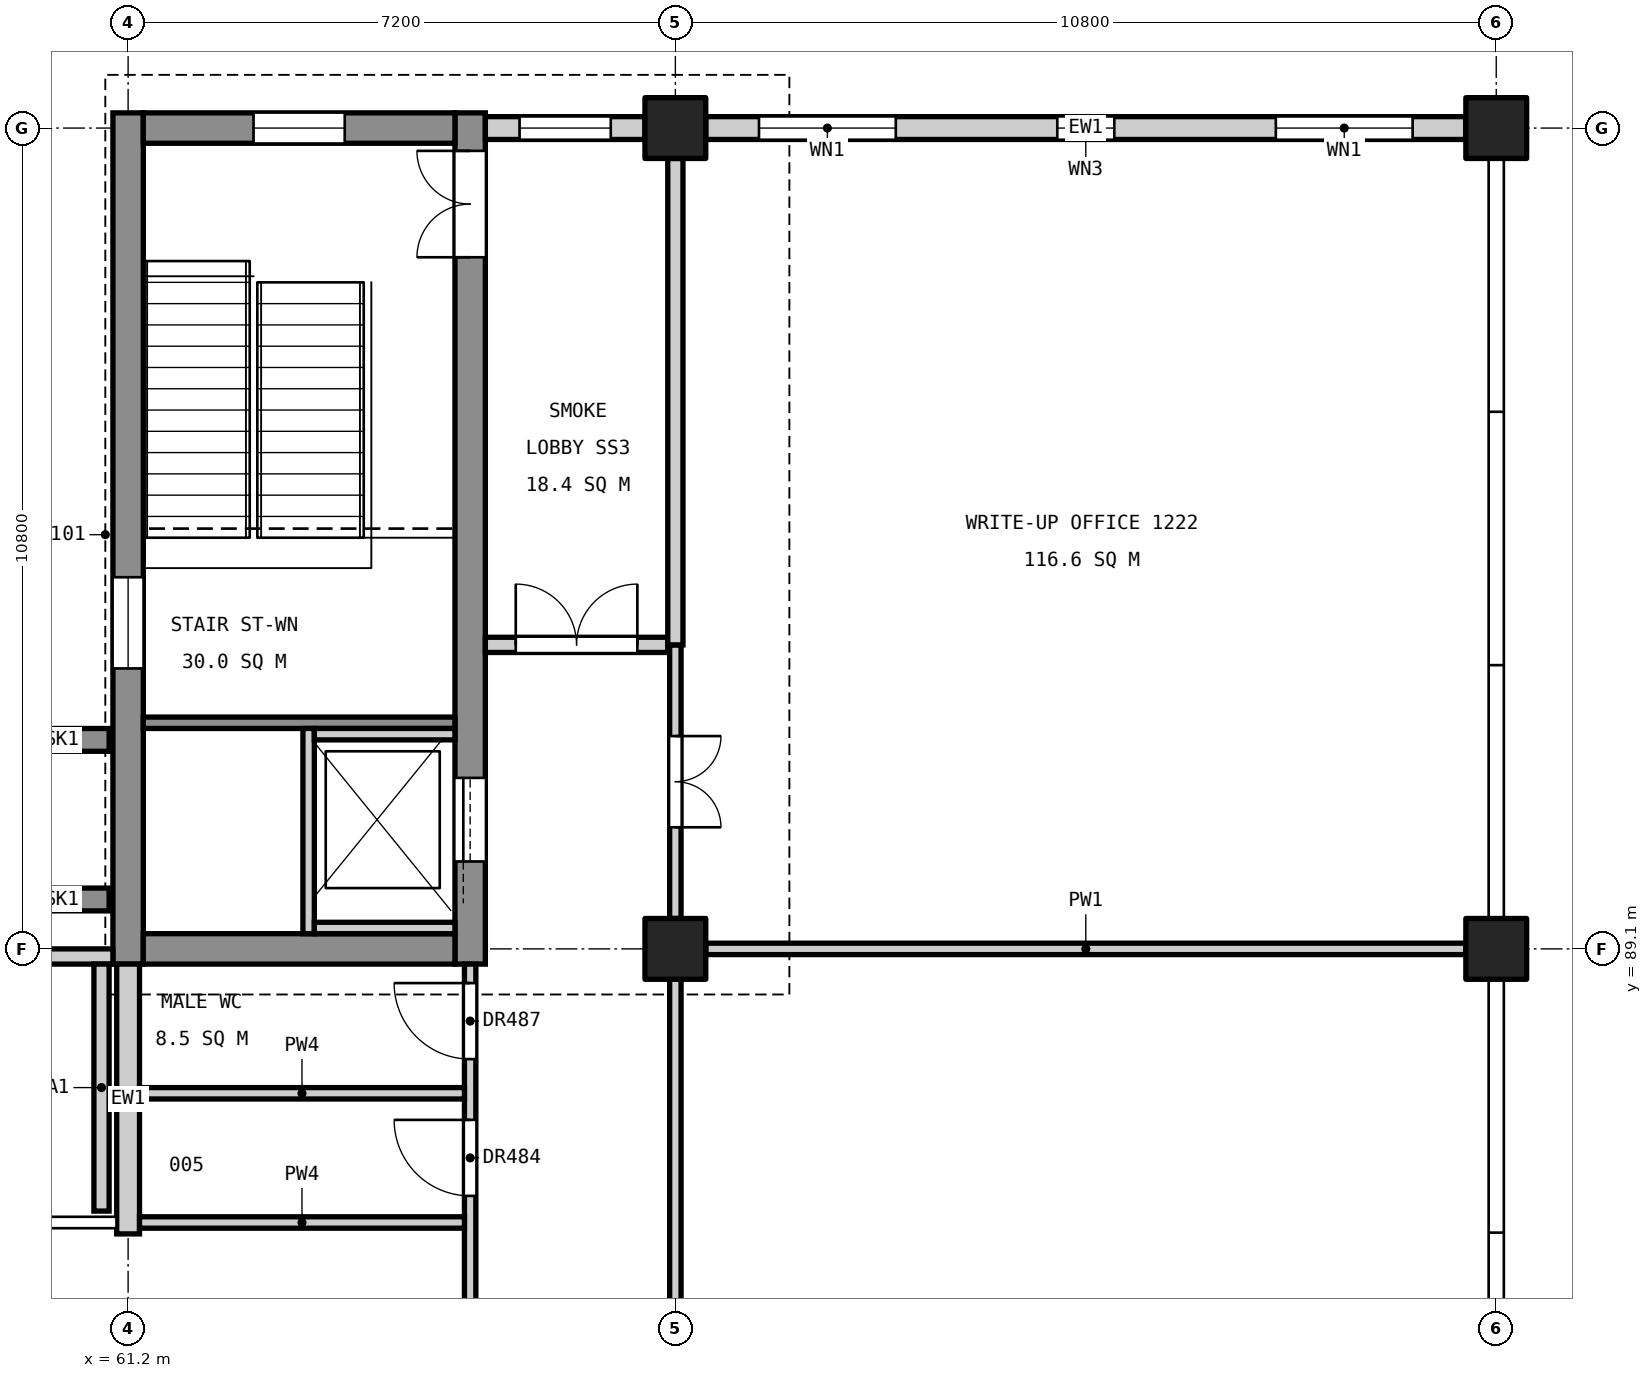
"""IFC4 building model, lengths in metres.
Left out: names, types, materials, properties, quantities, classifications, styles, units other than length and angle.
Written with IfcOpenShell. Run it as: python <this file> out.ifc"""

import sys

from ifc_helpers import new_model, si_unit, direction, frame, frame_2d, origin, origin_2d, place, context, subcontext, project, spatial, rectangle, extrude, element, fill, save


model = new_model("IFC4")
c1 = context("Model", 3, precision=1e-05, world=origin(), true_north=direction((0.0, 1.0)))
c2 = subcontext(c1, "Body", "Model", "MODEL_VIEW")
j1 = project(units=[si_unit("LENGTHUNIT", "METRE"), si_unit("PLANEANGLEUNIT", "RADIAN")], contexts=[c1])
p1 = place(None, origin())
s1 = spatial("IfcSite", under=j1, at=p1, CompositionType="ELEMENT")
p2 = place(p1, origin())
s2 = spatial("IfcBuilding", under=s1, at=p2, CompositionType="ELEMENT")
p3 = place(p2, frame((0.0, 0.0, 60.6)))
s3 = spatial("IfcBuildingStorey", under=s2, at=p3, CompositionType="ELEMENT", Elevation=60.6)
for number, where, z_axis, x_axis in (
    (1, (68.4, 89.1, 0.0), (0.0, 0.0, 1.0), (1.0, 0.0, 0.0)),
    (2, (68.4, 99.9, 0.0), (0.0, 0.0, 1.0), (1.0, 0.0, 0.0)),
    (3, (79.2, 89.1, 0.0), (0.0, 0.0, 1.0), (1.0, 0.0, 0.0)),
    (4, (79.2, 99.9, 0.0), (0.0, 0.0, 1.0), (1.0, 0.0, 0.0)),
):
    element("IfcColumn", number, at=place(p3, frame(where, z_axis=z_axis, x_axis=x_axis)), inside=s3, PredefinedType="COLUMN", context=c2, shape_type="SweptSolid", body=[
        extrude(rectangle(XDim=0.8, YDim=0.8, at=origin_2d()), origin(), (0.0, 0.0, 1.0), 4.8),
    ])
p4 = place(p3, frame((61.2, 88.9, 0.0), z_axis=(0.0, 0.0, 1.0), x_axis=(0.0, 1.0, 0.0)))
e5 = element("IfcWall", 5, at=p4, inside=s3, PredefinedType="SHEAR", context=c2, shape_type="SweptSolid", body=[
    extrude(rectangle(XDim=11.2, YDim=0.4, at=frame_2d((5.6, 0.0))), origin(), (0.0, 0.0, 1.0), 4.55),
])
p5 = place(p4, frame((3.89, 0.0, 3.4)))
e6 = element("IfcOpeningElement", 6, at=p5, cuts=e5, PredefinedType="OPENING", context=c2, shape_type="SweptSolid", body=[
    extrude(rectangle(XDim=1.2, YDim=0.9, at=frame_2d((0.6, 0.45))), frame((0.0, 0.21, 0.0), z_axis=(0.0, -1.0, 0.0), x_axis=(1.0, 0.0, 0.0)), (0.0, 0.0, 1.0), 0.42),
])
p6 = place(p3, frame((65.7, 88.9, 0.0), z_axis=(0.0, 0.0, 1.0), x_axis=(0.0, 1.0, 0.0)))
e7 = element("IfcWall", 7, at=p6, inside=s3, PredefinedType="SHEAR", context=c2, shape_type="SweptSolid", body=[
    extrude(rectangle(XDim=11.2, YDim=0.4, at=frame_2d((5.6, 0.0))), origin(), (0.0, 0.0, 1.0), 4.55),
])
p7 = place(p6, frame((9.3, 0.0, 0.0)))
e8 = element("IfcOpeningElement", 8, at=p7, cuts=e7, PredefinedType="OPENING", context=c2, shape_type="SweptSolid", body=[
    extrude(rectangle(XDim=1.4, YDim=2.1, at=frame_2d((0.7, 1.05))), frame((0.0, 0.21, 0.0), z_axis=(0.0, -1.0, 0.0), x_axis=(1.0, 0.0, 0.0)), (0.0, 0.0, 1.0), 0.42),
])
p8 = place(p6, frame((1.35, 0.0, 0.0)))
e9 = element("IfcOpeningElement", 9, at=p8, cuts=e7, PredefinedType="OPENING", context=c2, shape_type="SweptSolid", body=[
    extrude(rectangle(XDim=1.1, YDim=2.1, at=frame_2d((0.55, 1.05))), frame((0.0, 0.21, 0.0), z_axis=(0.0, -1.0, 0.0), x_axis=(1.0, 0.0, 0.0)), (0.0, 0.0, 1.0), 0.42),
])
p9 = place(p3, frame((61.4, 89.1, 0.0), z_axis=(0.0, 0.0, 1.0), x_axis=(1.0, 0.0, 0.0)))
e10 = element("IfcWall", 10, at=p9, inside=s3, PredefinedType="SHEAR", context=c2, shape_type="SweptSolid", body=[
    extrude(rectangle(XDim=4.1, YDim=0.4, at=frame_2d((2.05, 0.0))), origin(), (0.0, 0.0, 1.0), 4.55),
])
p10 = place(p3, frame((61.4, 99.9, 0.0), z_axis=(0.0, 0.0, 1.0), x_axis=(1.0, 0.0, 0.0)))
e11 = element("IfcWall", 11, at=p10, inside=s3, PredefinedType="SHEAR", context=c2, shape_type="SweptSolid", body=[
    extrude(rectangle(XDim=4.1, YDim=0.4, at=frame_2d((2.05, 0.0))), origin(), (0.0, 0.0, 1.0), 4.55),
])
p11 = place(p10, frame((1.45, 0.0, 3.4)))
e12 = element("IfcOpeningElement", 12, at=p11, cuts=e11, PredefinedType="OPENING", context=c2, shape_type="SweptSolid", body=[
    extrude(rectangle(XDim=1.2, YDim=0.9, at=frame_2d((0.6, 0.45))), frame((0.0, 0.21, 0.0), z_axis=(0.0, -1.0, 0.0), x_axis=(1.0, 0.0, 0.0)), (0.0, 0.0, 1.0), 0.42),
])
for number, where, z_axis, x_axis in (
    (13, (60.95, 89.75, 0.0), (0.0, 0.0, 1.0), (-1.0, 0.0, 0.0)),
    (14, (60.95, 91.85, 0.0), (0.0, 0.0, 1.0), (-1.0, 0.0, 0.0)),
):
    element("IfcWall", number, at=place(p3, frame(where, z_axis=z_axis, x_axis=x_axis)), inside=s3, PredefinedType="SHEAR", context=c2, shape_type="SweptSolid", body=[
        extrude(rectangle(XDim=1.25, YDim=0.3, at=frame_2d((0.625, 0.0))), origin(), (0.0, 0.0, 1.0), 4.8),
    ])
p12 = place(p3, frame((61.4, 92.075, 0.0), z_axis=(0.0, 0.0, 1.0), x_axis=(1.0, 0.0, 0.0)))
e15 = element("IfcWall", 15, at=p12, inside=s3, PredefinedType="SOLIDWALL", context=c2, shape_type="SweptSolid", body=[
    extrude(rectangle(XDim=4.1, YDim=0.15, at=frame_2d((2.05, 0.0))), origin(), (0.0, 0.0, 1.0), 4.55),
])
p13 = place(p3, frame((63.575, 92.0, 0.0), z_axis=(0.0, 0.0, 1.0), x_axis=(0.0, -1.0, 0.0)))
e16 = element("IfcWall", 16, at=p13, inside=s3, PredefinedType="SOLIDWALL", context=c2, shape_type="SweptSolid", body=[
    extrude(rectangle(XDim=2.7, YDim=0.15, at=frame_2d((1.35, 0.0))), origin(), (0.0, 0.0, 1.0), 4.8),
])
for number, where, z_axis, x_axis in (
    (17, (63.65, 91.925, 0.0), (0.0, 0.0, 1.0), (1.0, 0.0, 0.0)),
    (18, (63.65, 89.375, 0.0), (0.0, 0.0, 1.0), (1.0, 0.0, 0.0)),
):
    element("IfcWall", number, at=place(p3, frame(where, z_axis=z_axis, x_axis=x_axis)), inside=s3, PredefinedType="SOLIDWALL", context=c2, shape_type="SweptSolid", body=[
        extrude(rectangle(XDim=1.85, YDim=0.15, at=frame_2d((0.925, 0.0))), origin(), (0.0, 0.0, 1.0), 4.8),
    ])
p14 = place(p3, frame((57.6, 89.0, 0.0), z_axis=(0.0, 0.0, 1.0), x_axis=(1.0, 0.0, 0.0)))
e19 = element("IfcWall", 19, at=p14, inside=s3, PredefinedType="PARAPET", context=c2, shape_type="SweptSolid", body=[
    extrude(rectangle(XDim=3.4, YDim=0.2, at=frame_2d((1.7, 0.0))), origin(), (0.0, 0.0, 1.0), 1.2),
])
p15 = place(p3, frame((60.85, 88.9, 0.0), z_axis=(0.0, 0.0, 1.0), x_axis=(0.0, -1.0, 0.0)))
e20 = element("IfcWall", 20, at=p15, inside=s3, PredefinedType="PARAPET", context=c2, shape_type="SweptSolid", body=[
    extrude(rectangle(XDim=3.25, YDim=0.2, at=frame_2d((1.625, 0.0))), origin(), (0.0, 0.0, 1.0), 1.2),
])
p16 = place(p3, frame((61.2, 85.35, 0.0), z_axis=(0.0, 0.0, 1.0), x_axis=(0.0, 1.0, 0.0)))
e21 = element("IfcWall", 21, at=p16, inside=s3, PredefinedType="STANDARD", context=c2, shape_type="SweptSolid", body=[
    extrude(rectangle(XDim=3.55, YDim=0.3, at=frame_2d((1.775, 0.0))), origin(), (0.0, 0.0, 1.0), 3.65),
])
p17 = place(p3, frame((65.9, 99.9, 0.0), z_axis=(0.0, 0.0, 1.0), x_axis=(1.0, 0.0, 0.0)))
e22 = element("IfcWall", 22, at=p17, inside=s3, PredefinedType="STANDARD", context=c2, shape_type="SweptSolid", body=[
    extrude(rectangle(XDim=2.1, YDim=0.3, at=frame_2d((1.05, 0.0))), origin(), (0.0, 0.0, 1.0), 3.85),
])
p18 = place(p17, frame((0.45, 0.0, 0.9)))
e23 = element("IfcOpeningElement", 23, at=p18, cuts=e22, PredefinedType="OPENING", context=c2, shape_type="SweptSolid", body=[
    extrude(rectangle(XDim=1.2, YDim=2.4, at=frame_2d((0.6, 1.2))), frame((0.0, 0.16, 0.0), z_axis=(0.0, -1.0, 0.0), x_axis=(1.0, 0.0, 0.0)), (0.0, 0.0, 1.0), 0.32),
])
p19 = place(p3, frame((68.8, 99.9, 0.0), z_axis=(0.0, 0.0, 1.0), x_axis=(1.0, 0.0, 0.0)))
e24 = element("IfcWall", 24, at=p19, inside=s3, PredefinedType="STANDARD", context=c2, shape_type="SweptSolid", body=[
    extrude(rectangle(XDim=10.0, YDim=0.3, at=frame_2d((5.0, 0.0))), origin(), (0.0, 0.0, 1.0), 3.85),
])
p20 = place(p19, frame((0.7, 0.0, 0.9)))
e25 = element("IfcOpeningElement", 25, at=p20, cuts=e24, PredefinedType="OPENING", context=c2, shape_type="SweptSolid", body=[
    extrude(rectangle(XDim=1.8, YDim=2.4, at=frame_2d((0.9, 1.2))), frame((0.0, 0.16, 0.0), z_axis=(0.0, -1.0, 0.0), x_axis=(1.0, 0.0, 0.0)), (0.0, 0.0, 1.0), 0.32),
])
p21 = place(p19, frame((4.625, 0.0, 0.8)))
e26 = element("IfcOpeningElement", 26, at=p21, cuts=e24, PredefinedType="OPENING", context=c2, shape_type="SweptSolid", body=[
    extrude(rectangle(XDim=0.75, YDim=1.2, at=frame_2d((0.375, 0.6))), frame((0.0, 0.16, 0.0), z_axis=(0.0, -1.0, 0.0), x_axis=(1.0, 0.0, 0.0)), (0.0, 0.0, 1.0), 0.32),
])
p22 = place(p19, frame((7.5, 0.0, 0.9)))
e27 = element("IfcOpeningElement", 27, at=p22, cuts=e24, PredefinedType="OPENING", context=c2, shape_type="SweptSolid", body=[
    extrude(rectangle(XDim=1.8, YDim=2.4, at=frame_2d((0.9, 1.2))), frame((0.0, 0.16, 0.0), z_axis=(0.0, -1.0, 0.0), x_axis=(1.0, 0.0, 0.0)), (0.0, 0.0, 1.0), 0.32),
])
p23 = place(p3, frame((65.7, 78.45, 0.0), z_axis=(0.0, 0.0, 1.0), x_axis=(0.0, 1.0, 0.0)))
e28 = element("IfcWall", 28, at=p23, inside=s3, PredefinedType="PARTITIONING", context=c2, shape_type="SweptSolid", body=[
    extrude(rectangle(XDim=10.45, YDim=0.15, at=frame_2d((5.225, 0.0))), origin(), (0.0, 0.0, 1.0), 3.55),
])
p24 = place(p23, frame((7.4, 0.0, 0.0)))
e29 = element("IfcOpeningElement", 29, at=p24, cuts=e28, PredefinedType="OPENING", context=c2, shape_type="SweptSolid", body=[
    extrude(rectangle(XDim=1.0, YDim=2.1, at=frame_2d((0.5, 1.05))), frame((0.0, 0.085, 0.0), z_axis=(0.0, -1.0, 0.0), x_axis=(1.0, 0.0, 0.0)), (0.0, 0.0, 1.0), 0.17),
])
p25 = place(p23, frame((9.2, 0.0, 0.0)))
e30 = element("IfcOpeningElement", 30, at=p25, cuts=e28, PredefinedType="OPENING", context=c2, shape_type="SweptSolid", body=[
    extrude(rectangle(XDim=1.0, YDim=2.1, at=frame_2d((0.5, 1.05))), frame((0.0, 0.085, 0.0), z_axis=(0.0, -1.0, 0.0), x_axis=(1.0, 0.0, 0.0)), (0.0, 0.0, 1.0), 0.17),
])
p26 = place(p23, frame((2.95, 0.0, 0.0)))
e31 = element("IfcOpeningElement", 31, at=p26, cuts=e28, PredefinedType="OPENING", context=c2, shape_type="SweptSolid", body=[
    extrude(rectangle(XDim=1.0, YDim=2.1, at=frame_2d((0.5, 1.05))), frame((0.0, 0.085, 0.0), z_axis=(0.0, -1.0, 0.0), x_axis=(1.0, 0.0, 0.0)), (0.0, 0.0, 1.0), 0.17),
])
p27 = place(p3, frame((61.35, 85.5, 0.0), z_axis=(0.0, 0.0, 1.0), x_axis=(1.0, 0.0, 0.0)))
e32 = element("IfcWall", 32, at=p27, inside=s3, PredefinedType="PARTITIONING", context=c2, shape_type="SweptSolid", body=[
    extrude(rectangle(XDim=4.275, YDim=0.15, at=frame_2d((2.137, 0.0))), origin(), (0.0, 0.0, 1.0), 3.85),
])
p28 = place(p3, frame((61.35, 87.2, 0.0), z_axis=(0.0, 0.0, 1.0), x_axis=(1.0, 0.0, 0.0)))
e33 = element("IfcWall", 33, at=p28, inside=s3, PredefinedType="PARTITIONING", context=c2, shape_type="SweptSolid", body=[
    extrude(rectangle(XDim=4.275, YDim=0.15, at=frame_2d((2.137, 0.0))), origin(), (0.0, 0.0, 1.0), 3.55),
])
p29 = place(p3, frame((65.9, 93.1, 0.0), z_axis=(0.0, 0.0, 1.0), x_axis=(1.0, 0.0, 0.0)))
e34 = element("IfcWall", 34, at=p29, inside=s3, PredefinedType="PARTITIONING", context=c2, shape_type="SweptSolid", body=[
    extrude(rectangle(XDim=2.4, YDim=0.2, at=frame_2d((1.2, 0.0))), origin(), (0.0, 0.0, 1.0), 3.55),
])
p30 = place(p29, frame((0.4, 0.0, 0.0)))
e35 = element("IfcOpeningElement", 35, at=p30, cuts=e34, PredefinedType="OPENING", context=c2, shape_type="SweptSolid", body=[
    extrude(rectangle(XDim=1.6, YDim=2.1, at=frame_2d((0.8, 1.05))), frame((0.0, 0.11, 0.0), z_axis=(0.0, -1.0, 0.0), x_axis=(1.0, 0.0, 0.0)), (0.0, 0.0, 1.0), 0.22),
])
p31 = place(p3, frame((68.4, 78.7, 0.0), z_axis=(0.0, 0.0, 1.0), x_axis=(0.0, 1.0, 0.0)))
e36 = element("IfcWall", 36, at=p31, inside=s3, PredefinedType="PARTITIONING", context=c2, shape_type="SweptSolid", body=[
    extrude(rectangle(XDim=10.0, YDim=0.15, at=frame_2d((5.0, 0.0))), origin(), (0.0, 0.0, 1.0), 3.55),
])
p32 = place(p31, frame((4.4, 0.0, 0.0)))
e37 = element("IfcOpeningElement", 37, at=p32, cuts=e36, PredefinedType="OPENING", context=c2, shape_type="SweptSolid", body=[
    extrude(rectangle(XDim=1.2, YDim=2.1, at=frame_2d((0.6, 1.05))), frame((0.0, 0.085, 0.0), z_axis=(0.0, -1.0, 0.0), x_axis=(1.0, 0.0, 0.0)), (0.0, 0.0, 1.0), 0.17),
])
p33 = place(p3, frame((68.4, 89.5, 0.0), z_axis=(0.0, 0.0, 1.0), x_axis=(0.0, 1.0, 0.0)))
e38 = element("IfcWall", 38, at=p33, inside=s3, PredefinedType="PARTITIONING", context=c2, shape_type="SweptSolid", body=[
    extrude(rectangle(XDim=3.6, YDim=0.15, at=frame_2d((1.8, 0.0))), origin(), (0.0, 0.0, 1.0), 3.55),
])
p34 = place(p33, frame((1.2, 0.0, 0.0)))
e39 = element("IfcOpeningElement", 39, at=p34, cuts=e38, PredefinedType="OPENING", context=c2, shape_type="SweptSolid", body=[
    extrude(rectangle(XDim=1.2, YDim=2.1, at=frame_2d((0.6, 1.05))), frame((0.0, 0.085, 0.0), z_axis=(0.0, -1.0, 0.0), x_axis=(1.0, 0.0, 0.0)), (0.0, 0.0, 1.0), 0.17),
])
p35 = place(p3, frame((68.4, 93.1, 0.0), z_axis=(0.0, 0.0, 1.0), x_axis=(0.0, 1.0, 0.0)))
e40 = element("IfcWall", 40, at=p35, inside=s3, PredefinedType="PARTITIONING", context=c2, shape_type="SweptSolid", body=[
    extrude(rectangle(XDim=6.4, YDim=0.2, at=frame_2d((3.2, 0.0))), origin(), (0.0, 0.0, 1.0), 3.55),
])
p36 = place(p3, frame((68.8, 89.1, 0.0), z_axis=(0.0, 0.0, 1.0), x_axis=(1.0, 0.0, 0.0)))
e41 = element("IfcWall", 41, at=p36, inside=s3, PredefinedType="PARTITIONING", context=c2, shape_type="SweptSolid", body=[
    extrude(rectangle(XDim=10.0, YDim=0.15, at=frame_2d((5.0, 0.0))), origin(), (0.0, 0.0, 1.0), 3.85),
])
p37 = place(p7, origin())
e42 = element("IfcDoor", 42, at=p37, inside=s3, OperationType="DOUBLE_DOOR_SINGLE_SWING", PredefinedType="DOOR", context=c2, shape_type="SweptSolid", body=[
    extrude(rectangle(XDim=1.4, YDim=2.1, at=frame_2d((0.7, 1.05))), frame((0.0, 0.025, 0.0), z_axis=(0.0, -1.0, 0.0), x_axis=(1.0, 0.0, 0.0)), (0.0, 0.0, 1.0), 0.05),
])
fill(e8, e42)
p38 = place(p8, origin())
e43 = element("IfcDoor", 43, at=p38, inside=s3, OperationType="SLIDING_TO_LEFT", PredefinedType="DOOR", context=c2, shape_type="SweptSolid", body=[
    extrude(rectangle(XDim=1.1, YDim=2.1, at=frame_2d((0.55, 1.05))), frame((0.0, 0.025, 0.0), z_axis=(0.0, -1.0, 0.0), x_axis=(1.0, 0.0, 0.0)), (0.0, 0.0, 1.0), 0.05),
])
fill(e9, e43)
p39 = place(p18, origin())
e44 = element("IfcWindow", 44, at=p39, inside=s3, PartitioningType="SINGLE_PANEL", PredefinedType="WINDOW", context=c2, shape_type="SweptSolid", body=[
    extrude(rectangle(XDim=1.2, YDim=2.4, at=frame_2d((0.6, 1.2))), frame((0.0, 0.03, 0.0), z_axis=(0.0, -1.0, 0.0), x_axis=(1.0, 0.0, 0.0)), (0.0, 0.0, 1.0), 0.06),
])
fill(e23, e44)
p40 = place(p20, origin())
e45 = element("IfcWindow", 45, at=p40, inside=s3, PartitioningType="SINGLE_PANEL", PredefinedType="WINDOW", context=c2, shape_type="SweptSolid", body=[
    extrude(rectangle(XDim=1.8, YDim=2.4, at=frame_2d((0.9, 1.2))), frame((0.0, 0.03, 0.0), z_axis=(0.0, -1.0, 0.0), x_axis=(1.0, 0.0, 0.0)), (0.0, 0.0, 1.0), 0.06),
])
fill(e25, e45)
p41 = place(p21, origin())
e46 = element("IfcWindow", 46, at=p41, inside=s3, PartitioningType="SINGLE_PANEL", PredefinedType="WINDOW", context=c2, shape_type="SweptSolid", body=[
    extrude(rectangle(XDim=0.75, YDim=1.2, at=frame_2d((0.375, 0.6))), frame((0.0, 0.03, 0.0), z_axis=(0.0, -1.0, 0.0), x_axis=(1.0, 0.0, 0.0)), (0.0, 0.0, 1.0), 0.06),
])
fill(e26, e46)
p42 = place(p22, origin())
e47 = element("IfcWindow", 47, at=p42, inside=s3, PartitioningType="SINGLE_PANEL", PredefinedType="WINDOW", context=c2, shape_type="SweptSolid", body=[
    extrude(rectangle(XDim=1.8, YDim=2.4, at=frame_2d((0.9, 1.2))), frame((0.0, 0.03, 0.0), z_axis=(0.0, -1.0, 0.0), x_axis=(1.0, 0.0, 0.0)), (0.0, 0.0, 1.0), 0.06),
])
fill(e27, e47)
p43 = place(p5, origin())
e48 = element("IfcWindow", 48, at=p43, inside=s3, PartitioningType="SINGLE_PANEL", PredefinedType="WINDOW", context=c2, shape_type="SweptSolid", body=[
    extrude(rectangle(XDim=1.2, YDim=0.9, at=frame_2d((0.6, 0.45))), frame((0.0, 0.03, 0.0), z_axis=(0.0, -1.0, 0.0), x_axis=(1.0, 0.0, 0.0)), (0.0, 0.0, 1.0), 0.06),
])
fill(e6, e48)
p44 = place(p11, origin())
e49 = element("IfcWindow", 49, at=p44, inside=s3, PartitioningType="SINGLE_PANEL", PredefinedType="WINDOW", context=c2, shape_type="SweptSolid", body=[
    extrude(rectangle(XDim=1.2, YDim=0.9, at=frame_2d((0.6, 0.45))), frame((0.0, 0.03, 0.0), z_axis=(0.0, -1.0, 0.0), x_axis=(1.0, 0.0, 0.0)), (0.0, 0.0, 1.0), 0.06),
])
fill(e12, e49)
p45 = place(p24, origin())
e50 = element("IfcDoor", 50, at=p45, inside=s3, OperationType="SINGLE_SWING_RIGHT", PredefinedType="DOOR", context=c2, shape_type="SweptSolid", body=[
    extrude(rectangle(XDim=1.0, YDim=2.1, at=frame_2d((0.5, 1.05))), frame((0.0, 0.025, 0.0), z_axis=(0.0, -1.0, 0.0), x_axis=(1.0, 0.0, 0.0)), (0.0, 0.0, 1.0), 0.05),
])
fill(e29, e50)
p46 = place(p25, origin())
e51 = element("IfcDoor", 51, at=p46, inside=s3, OperationType="SINGLE_SWING_RIGHT", PredefinedType="DOOR", context=c2, shape_type="SweptSolid", body=[
    extrude(rectangle(XDim=1.0, YDim=2.1, at=frame_2d((0.5, 1.05))), frame((0.0, 0.025, 0.0), z_axis=(0.0, -1.0, 0.0), x_axis=(1.0, 0.0, 0.0)), (0.0, 0.0, 1.0), 0.05),
])
fill(e30, e51)
p47 = place(p34, frame((1.2, 0.0, 0.0), z_axis=(0.0, 0.0, 1.0), x_axis=(-1.0, 0.0, 0.0)))
e52 = element("IfcDoor", 52, at=p47, inside=s3, OperationType="DOUBLE_DOOR_SINGLE_SWING", PredefinedType="DOOR", context=c2, shape_type="SweptSolid", body=[
    extrude(rectangle(XDim=1.2, YDim=2.1, at=frame_2d((0.6, 1.05))), frame((0.0, 0.025, 0.0), z_axis=(0.0, -1.0, 0.0), x_axis=(1.0, 0.0, 0.0)), (0.0, 0.0, 1.0), 0.05),
])
fill(e39, e52)
p48 = place(p30, origin())
e53 = element("IfcDoor", 53, at=p48, inside=s3, OperationType="DOUBLE_DOOR_SINGLE_SWING", PredefinedType="DOOR", context=c2, shape_type="SweptSolid", body=[
    extrude(rectangle(XDim=1.6, YDim=2.1, at=frame_2d((0.8, 1.05))), frame((0.0, 0.025, 0.0), z_axis=(0.0, -1.0, 0.0), x_axis=(1.0, 0.0, 0.0)), (0.0, 0.0, 1.0), 0.05),
])
fill(e35, e53)
save(model, sys.argv[1])
